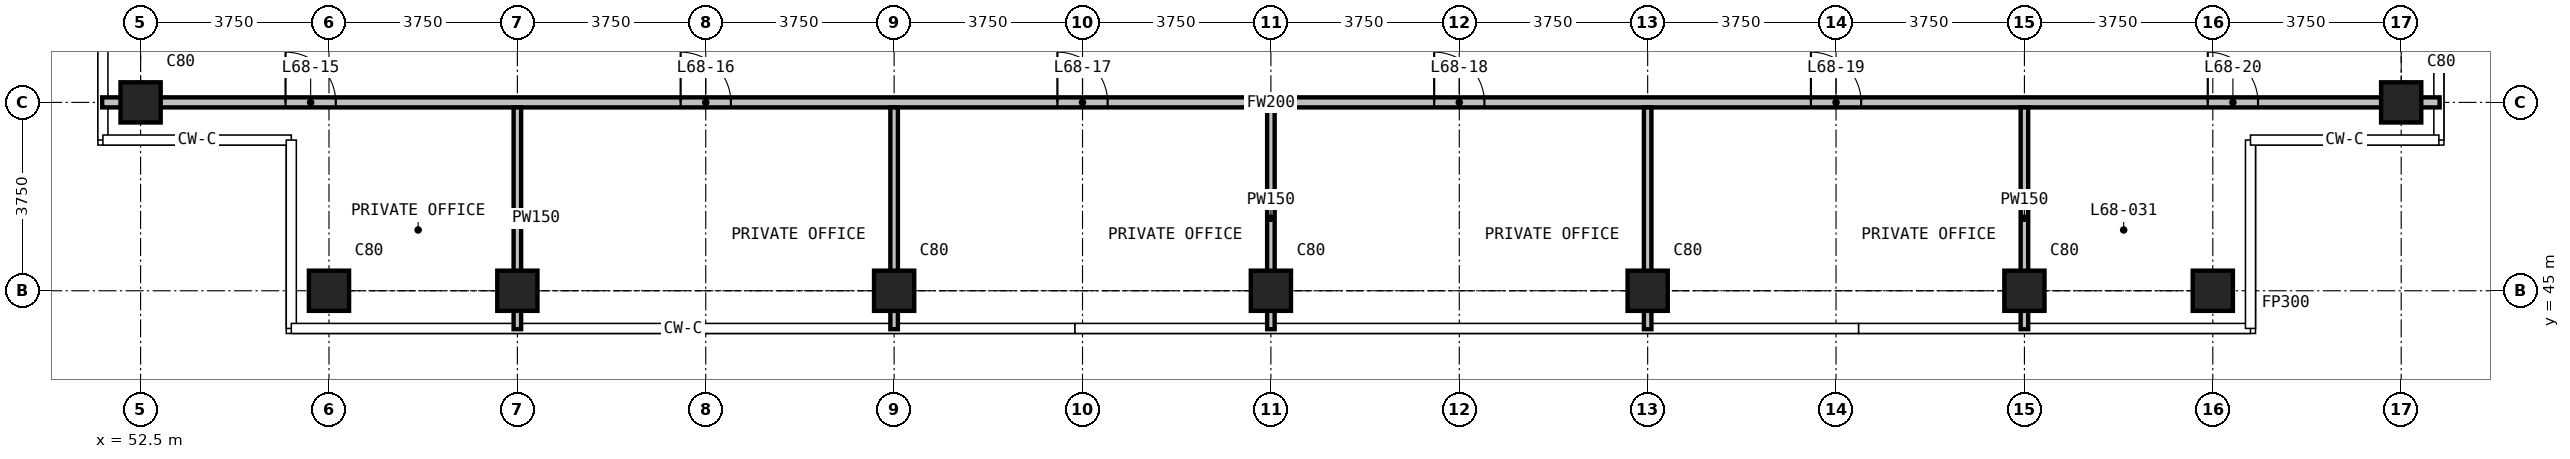
"""IFC4 building model, lengths in metres.
Left out: names, types, materials, properties, quantities, classifications, styles, units other than length and angle.
Written with IfcOpenShell. Run it as: python <this file> out.ifc"""

import sys

from ifc_helpers import new_model, si_unit, direction, frame, frame_2d, origin, origin_2d, place, context, subcontext, project, spatial, rectangle, extrude, element, fill, save


model = new_model("IFC4")
c1 = context("Model", 3, precision=1e-05, world=origin(), true_north=direction((0.0, 1.0)))
c2 = subcontext(c1, "Body", "Model", "MODEL_VIEW")
j1 = project(units=[si_unit("LENGTHUNIT", "METRE"), si_unit("PLANEANGLEUNIT", "RADIAN")], contexts=[c1])
p1 = place(None, origin())
s1 = spatial("IfcSite", under=j1, at=p1, CompositionType="ELEMENT")
p2 = place(p1, origin())
s2 = spatial("IfcBuilding", under=s1, at=p2, CompositionType="ELEMENT")
p3 = place(p2, frame((0.0, 0.0, 262.1)))
s3 = spatial("IfcBuildingStorey", under=s2, at=p3, CompositionType="ELEMENT", Elevation=262.1)
for number, where, z_axis, x_axis in (
    (1, (52.5, 48.75, 0.0), (0.0, 0.0, 1.0), (1.0, 0.0, 0.0)),
    (2, (56.25, 45.0, 0.0), (0.0, 0.0, 1.0), (1.0, 0.0, 0.0)),
    (3, (60.0, 45.0, 0.0), (0.0, 0.0, 1.0), (1.0, 0.0, 0.0)),
    (4, (67.5, 45.0, 0.0), (0.0, 0.0, 1.0), (1.0, 0.0, 0.0)),
    (5, (75.0, 45.0, 0.0), (0.0, 0.0, 1.0), (1.0, 0.0, 0.0)),
    (6, (82.5, 45.0, 0.0), (0.0, 0.0, 1.0), (1.0, 0.0, 0.0)),
    (7, (90.0, 45.0, 0.0), (0.0, 0.0, 1.0), (1.0, 0.0, 0.0)),
    (8, (93.75, 45.0, 0.0), (0.0, 0.0, 1.0), (1.0, 0.0, 0.0)),
    (9, (97.5, 48.75, 0.0), (0.0, 0.0, 1.0), (1.0, 0.0, 0.0)),
):
    element("IfcColumn", number, at=place(p3, frame(where, z_axis=z_axis, x_axis=x_axis)), inside=s3, PredefinedType="COLUMN", context=c2, shape_type="SweptSolid", body=[
        extrude(rectangle(XDim=0.8, YDim=0.8, at=origin_2d()), origin(), (0.0, 0.0, 1.0), 3.6),
    ])
p4 = place(p3, frame((51.735, 48.75, 0.0), z_axis=(0.0, 0.0, 1.0), x_axis=(1.0, 0.0, 0.0)))
e10 = element("IfcWall", 10, at=p4, inside=s3, PredefinedType="PARTITIONING", context=c2, shape_type="SweptSolid", body=[
    extrude(rectangle(XDim=46.53, YDim=0.2, at=frame_2d((23.265, 0.0))), origin(), (0.0, 0.0, 1.0), 3.3),
])
p5 = place(p4, frame((3.65, 0.0, 0.0)))
e11 = element("IfcOpeningElement", 11, at=p5, cuts=e10, PredefinedType="OPENING", context=c2, shape_type="SweptSolid", body=[
    extrude(rectangle(XDim=1.0, YDim=2.2, at=frame_2d((0.5, 1.1))), frame((0.0, 0.11, 0.0), z_axis=(0.0, -1.0, 0.0), x_axis=(1.0, 0.0, 0.0)), (0.0, 0.0, 1.0), 0.22),
])
p6 = place(p4, frame((11.515, 0.0, 0.0)))
e12 = element("IfcOpeningElement", 12, at=p6, cuts=e10, PredefinedType="OPENING", context=c2, shape_type="SweptSolid", body=[
    extrude(rectangle(XDim=1.0, YDim=2.2, at=frame_2d((0.5, 1.1))), frame((0.0, 0.11, 0.0), z_axis=(0.0, -1.0, 0.0), x_axis=(1.0, 0.0, 0.0)), (0.0, 0.0, 1.0), 0.22),
])
p7 = place(p4, frame((19.015, 0.0, 0.0)))
e13 = element("IfcOpeningElement", 13, at=p7, cuts=e10, PredefinedType="OPENING", context=c2, shape_type="SweptSolid", body=[
    extrude(rectangle(XDim=1.0, YDim=2.2, at=frame_2d((0.5, 1.1))), frame((0.0, 0.11, 0.0), z_axis=(0.0, -1.0, 0.0), x_axis=(1.0, 0.0, 0.0)), (0.0, 0.0, 1.0), 0.22),
])
p8 = place(p4, frame((26.515, 0.0, 0.0)))
e14 = element("IfcOpeningElement", 14, at=p8, cuts=e10, PredefinedType="OPENING", context=c2, shape_type="SweptSolid", body=[
    extrude(rectangle(XDim=1.0, YDim=2.2, at=frame_2d((0.5, 1.1))), frame((0.0, 0.11, 0.0), z_axis=(0.0, -1.0, 0.0), x_axis=(1.0, 0.0, 0.0)), (0.0, 0.0, 1.0), 0.22),
])
p9 = place(p4, frame((34.015, 0.0, 0.0)))
e15 = element("IfcOpeningElement", 15, at=p9, cuts=e10, PredefinedType="OPENING", context=c2, shape_type="SweptSolid", body=[
    extrude(rectangle(XDim=1.0, YDim=2.2, at=frame_2d((0.5, 1.1))), frame((0.0, 0.11, 0.0), z_axis=(0.0, -1.0, 0.0), x_axis=(1.0, 0.0, 0.0)), (0.0, 0.0, 1.0), 0.22),
])
p10 = place(p4, frame((41.915, 0.0, 0.0)))
e16 = element("IfcOpeningElement", 16, at=p10, cuts=e10, PredefinedType="OPENING", context=c2, shape_type="SweptSolid", body=[
    extrude(rectangle(XDim=1.0, YDim=2.2, at=frame_2d((0.5, 1.1))), frame((0.0, 0.11, 0.0), z_axis=(0.0, -1.0, 0.0), x_axis=(1.0, 0.0, 0.0)), (0.0, 0.0, 1.0), 0.22),
])
for number, where, z_axis, x_axis in (
    (17, (60.0, 44.235, 0.0), (0.0, 0.0, 1.0), (0.0, 1.0, 0.0)),
    (18, (67.5, 44.235, 0.0), (0.0, 0.0, 1.0), (0.0, 1.0, 0.0)),
    (19, (75.0, 44.235, 0.0), (0.0, 0.0, 1.0), (0.0, 1.0, 0.0)),
    (20, (82.5, 44.235, 0.0), (0.0, 0.0, 1.0), (0.0, 1.0, 0.0)),
    (21, (90.0, 44.235, 0.0), (0.0, 0.0, 1.0), (0.0, 1.0, 0.0)),
):
    element("IfcWall", number, at=place(p3, frame(where, z_axis=z_axis, x_axis=x_axis)), inside=s3, PredefinedType="PARTITIONING", context=c2, shape_type="SweptSolid", body=[
        extrude(rectangle(XDim=4.415, YDim=0.15, at=frame_2d((2.208, 0.0))), origin(), (0.0, 0.0, 1.0), 3.3),
    ])
p11 = place(p5, origin())
e22 = element("IfcDoor", 22, at=p11, inside=s3, OperationType="SINGLE_SWING_LEFT", PredefinedType="DOOR", context=c2, shape_type="SweptSolid", body=[
    extrude(rectangle(XDim=1.0, YDim=2.2, at=frame_2d((0.5, 1.1))), frame((0.0, 0.025, 0.0), z_axis=(0.0, -1.0, 0.0), x_axis=(1.0, 0.0, 0.0)), (0.0, 0.0, 1.0), 0.05),
])
fill(e11, e22)
p12 = place(p6, origin())
e23 = element("IfcDoor", 23, at=p12, inside=s3, OperationType="SINGLE_SWING_LEFT", PredefinedType="DOOR", context=c2, shape_type="SweptSolid", body=[
    extrude(rectangle(XDim=1.0, YDim=2.2, at=frame_2d((0.5, 1.1))), frame((0.0, 0.025, 0.0), z_axis=(0.0, -1.0, 0.0), x_axis=(1.0, 0.0, 0.0)), (0.0, 0.0, 1.0), 0.05),
])
fill(e12, e23)
p13 = place(p7, origin())
e24 = element("IfcDoor", 24, at=p13, inside=s3, OperationType="SINGLE_SWING_LEFT", PredefinedType="DOOR", context=c2, shape_type="SweptSolid", body=[
    extrude(rectangle(XDim=1.0, YDim=2.2, at=frame_2d((0.5, 1.1))), frame((0.0, 0.025, 0.0), z_axis=(0.0, -1.0, 0.0), x_axis=(1.0, 0.0, 0.0)), (0.0, 0.0, 1.0), 0.05),
])
fill(e13, e24)
p14 = place(p8, origin())
e25 = element("IfcDoor", 25, at=p14, inside=s3, OperationType="SINGLE_SWING_LEFT", PredefinedType="DOOR", context=c2, shape_type="SweptSolid", body=[
    extrude(rectangle(XDim=1.0, YDim=2.2, at=frame_2d((0.5, 1.1))), frame((0.0, 0.025, 0.0), z_axis=(0.0, -1.0, 0.0), x_axis=(1.0, 0.0, 0.0)), (0.0, 0.0, 1.0), 0.05),
])
fill(e14, e25)
p15 = place(p9, origin())
e26 = element("IfcDoor", 26, at=p15, inside=s3, OperationType="SINGLE_SWING_LEFT", PredefinedType="DOOR", context=c2, shape_type="SweptSolid", body=[
    extrude(rectangle(XDim=1.0, YDim=2.2, at=frame_2d((0.5, 1.1))), frame((0.0, 0.025, 0.0), z_axis=(0.0, -1.0, 0.0), x_axis=(1.0, 0.0, 0.0)), (0.0, 0.0, 1.0), 0.05),
])
fill(e15, e26)
p16 = place(p10, origin())
e27 = element("IfcDoor", 27, at=p16, inside=s3, OperationType="SINGLE_SWING_RIGHT", PredefinedType="DOOR", context=c2, shape_type="SweptSolid", body=[
    extrude(rectangle(XDim=1.0, YDim=2.2, at=frame_2d((0.5, 1.1))), frame((0.0, 0.025, 0.0), z_axis=(0.0, -1.0, 0.0), x_axis=(1.0, 0.0, 0.0)), (0.0, 0.0, 1.0), 0.05),
])
fill(e16, e27)
save(model, sys.argv[1])
